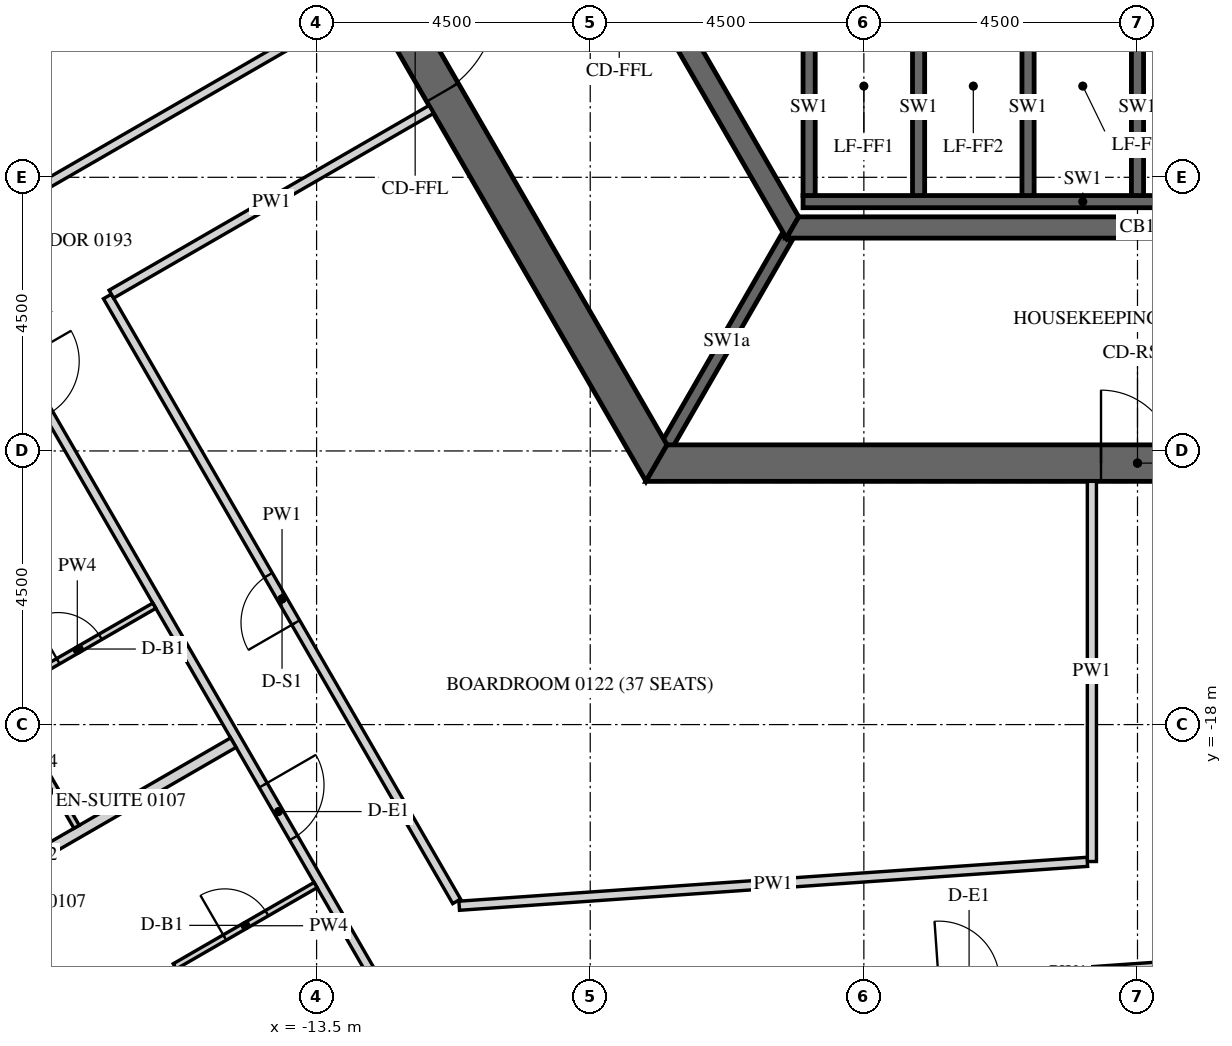
"""IFC4 building model, lengths in metres.
Left out: names, types, materials, properties, quantities, classifications, styles, units other than length and angle.
Written with IfcOpenShell. Run it as: python <this file> out.ifc"""

import sys

from ifc_helpers import new_model, si_unit, direction, frame, frame_2d, origin, place, context, subcontext, project, spatial, polyline, rectangle, outline, extrude, element, fill, save


model = new_model("IFC4")
c1 = context("Model", 3, precision=1e-05, world=origin(), true_north=direction((0.0, 1.0)))
c2 = subcontext(c1, "Body", "Model", "MODEL_VIEW")
j1 = project(units=[si_unit("LENGTHUNIT", "METRE"), si_unit("PLANEANGLEUNIT", "RADIAN")], contexts=[c1])
p1 = place(None, origin())
s1 = spatial("IfcSite", under=j1, at=p1, CompositionType="ELEMENT")
p2 = place(p1, origin())
s2 = spatial("IfcBuilding", under=s1, at=p2, CompositionType="ELEMENT")
p3 = place(p2, frame((0.0, 0.0, 37.5)))
s3 = spatial("IfcBuildingStorey", under=s2, at=p3, CompositionType="ELEMENT", Elevation=37.5)
p4 = place(p3, frame((-32.655, -2.89, -0.15), z_axis=(0.0, 0.0, 1.0), x_axis=(0.499997711317, -0.866026725152, 0.0)))
e1 = element("IfcWall", 1, at=p4, inside=s3, PredefinedType="SOLIDWALL", context=c2, shape_type="SweptSolid", body=[
    extrude(outline(polyline([(-0.022, -0.275), (30.097, -0.275), (30.045, 0.275), (0.022, 0.275), (-0.022, -0.275)])), origin(), (0.0, 0.0, 1.0), 3.9),
])
p5 = place(p4, frame((1.236, 0.0, 1.05)))
e2 = element("IfcOpeningElement", 2, at=p5, cuts=e1, PredefinedType="OPENING", context=c2, shape_type="SweptSolid", body=[
    extrude(rectangle(XDim=2.4, YDim=2.4, at=frame_2d((1.2, 1.2))), frame((0.0, 0.285, 0.0), z_axis=(0.0, -1.0, 0.0), x_axis=(1.0, 0.0, 0.0)), (0.0, 0.0, 1.0), 0.57),
])
p6 = place(p4, frame((4.835, 0.0, 1.05)))
e3 = element("IfcOpeningElement", 3, at=p6, cuts=e1, PredefinedType="OPENING", context=c2, shape_type="SweptSolid", body=[
    extrude(rectangle(XDim=2.4, YDim=2.4, at=frame_2d((1.2, 1.2))), frame((0.0, 0.285, 0.0), z_axis=(0.0, -1.0, 0.0), x_axis=(1.0, 0.0, 0.0)), (0.0, 0.0, 1.0), 0.57),
])
p7 = place(p4, frame((8.436, 0.0, 1.05)))
e4 = element("IfcOpeningElement", 4, at=p7, cuts=e1, PredefinedType="OPENING", context=c2, shape_type="SweptSolid", body=[
    extrude(rectangle(XDim=2.4, YDim=2.4, at=frame_2d((1.2, 1.2))), frame((0.0, 0.285, 0.0), z_axis=(0.0, -1.0, 0.0), x_axis=(1.0, 0.0, 0.0)), (0.0, 0.0, 1.0), 0.57),
])
p8 = place(p4, frame((12.035, 0.0, 1.05)))
e5 = element("IfcOpeningElement", 5, at=p8, cuts=e1, PredefinedType="OPENING", context=c2, shape_type="SweptSolid", body=[
    extrude(rectangle(XDim=2.4, YDim=2.4, at=frame_2d((1.2, 1.2))), frame((0.0, 0.285, 0.0), z_axis=(0.0, -1.0, 0.0), x_axis=(1.0, 0.0, 0.0)), (0.0, 0.0, 1.0), 0.57),
])
p9 = place(p4, frame((15.635, 0.0, 1.05)))
e6 = element("IfcOpeningElement", 6, at=p9, cuts=e1, PredefinedType="OPENING", context=c2, shape_type="SweptSolid", body=[
    extrude(rectangle(XDim=2.4, YDim=2.4, at=frame_2d((1.2, 1.2))), frame((0.0, 0.285, 0.0), z_axis=(0.0, -1.0, 0.0), x_axis=(1.0, 0.0, 0.0)), (0.0, 0.0, 1.0), 0.57),
])
p10 = place(p4, frame((19.236, 0.0, 1.05)))
e7 = element("IfcOpeningElement", 7, at=p10, cuts=e1, PredefinedType="OPENING", context=c2, shape_type="SweptSolid", body=[
    extrude(rectangle(XDim=2.4, YDim=2.4, at=frame_2d((1.2, 1.2))), frame((0.0, 0.285, 0.0), z_axis=(0.0, -1.0, 0.0), x_axis=(1.0, 0.0, 0.0)), (0.0, 0.0, 1.0), 0.57),
])
p11 = place(p4, frame((22.835, 0.0, 1.05)))
e8 = element("IfcOpeningElement", 8, at=p11, cuts=e1, PredefinedType="OPENING", context=c2, shape_type="SweptSolid", body=[
    extrude(rectangle(XDim=2.4, YDim=2.4, at=frame_2d((1.2, 1.2))), frame((0.0, 0.285, 0.0), z_axis=(0.0, -1.0, 0.0), x_axis=(1.0, 0.0, 0.0)), (0.0, 0.0, 1.0), 0.57),
])
p12 = place(p4, frame((26.436, 0.0, 1.05)))
e9 = element("IfcOpeningElement", 9, at=p12, cuts=e1, PredefinedType="OPENING", context=c2, shape_type="SweptSolid", body=[
    extrude(rectangle(XDim=2.4, YDim=2.4, at=frame_2d((1.2, 1.2))), frame((0.0, 0.285, 0.0), z_axis=(0.0, -1.0, 0.0), x_axis=(1.0, 0.0, 0.0)), (0.0, 0.0, 1.0), 0.57),
])
p13 = place(p3, frame((-15.819, 0.0, -0.15), z_axis=(0.0, 0.0, 1.0), x_axis=(0.499999880136, -0.866025472988, 0.0)))
e10 = element("IfcWall", 10, at=p13, inside=s3, PredefinedType="SHEAR", context=c2, shape_type="SweptSolid", body=[
    extrude(outline(polyline([(-0.173, -0.3), (15.993, -0.3), (15.646, 0.3), (0.173, 0.3), (-0.173, -0.3)])), origin(), (0.0, 0.0, 1.0), 3.9),
])
p14 = place(p13, frame((6.981, 0.0, 0.15)))
e11 = element("IfcOpeningElement", 11, at=p14, cuts=e10, PredefinedType="OPENING", context=c2, shape_type="SweptSolid", body=[
    extrude(rectangle(XDim=1.8, YDim=2.4, at=frame_2d((0.9, 1.2))), frame((0.0, 0.31, 0.0), z_axis=(0.0, -1.0, 0.0), x_axis=(1.0, 0.0, 0.0)), (0.0, 0.0, 1.0), 0.62),
])
p15 = place(p3, frame((-7.91, -13.7, -0.15), z_axis=(0.0, 0.0, 1.0), x_axis=(1.0, 0.0, 0.0)))
e12 = element("IfcWall", 12, at=p15, inside=s3, PredefinedType="SHEAR", context=c2, shape_type="SweptSolid", body=[
    extrude(outline(polyline([(-0.173, -0.3), (15.993, -0.3), (15.646, 0.3), (0.173, 0.3), (-0.173, -0.3)])), origin(), (0.0, 0.0, 1.0), 3.9),
])
p16 = place(p15, frame((7.31, 0.0, 0.15)))
e13 = element("IfcOpeningElement", 13, at=p16, cuts=e12, PredefinedType="OPENING", context=c2, shape_type="SweptSolid", body=[
    extrude(rectangle(XDim=1.2, YDim=2.4, at=frame_2d((0.6, 1.2))), frame((0.0, 0.31, 0.0), z_axis=(0.0, -1.0, 0.0), x_axis=(1.0, 0.0, 0.0)), (0.0, 0.0, 1.0), 0.62),
])
p17 = place(p3, frame((-11.345, 0.0, -0.15), z_axis=(0.0, 0.0, 1.0), x_axis=(0.499995046907, -0.866028263435, 0.0)))
e14 = element("IfcWall", 14, at=p17, inside=s3, PredefinedType="SHEAR", context=c2, shape_type="SweptSolid", body=[
    extrude(outline(polyline([(-0.101, -0.175), (11.446, -0.175), (11.244, 0.175), (0.101, 0.175), (-0.101, -0.175)])), origin(), (0.0, 0.0, 1.0), 3.9),
])
p18 = place(p17, frame((4.744, 0.0, 0.15)))
e15 = element("IfcOpeningElement", 15, at=p18, cuts=e14, PredefinedType="OPENING", context=c2, shape_type="SweptSolid", body=[
    extrude(rectangle(XDim=1.8, YDim=2.4, at=frame_2d((0.9, 1.2))), frame((0.0, 0.185, 0.0), z_axis=(0.0, -1.0, 0.0), x_axis=(1.0, 0.0, 0.0)), (0.0, 0.0, 1.0), 0.37),
])
p19 = place(p3, frame((-5.673, -9.825, -0.15), z_axis=(0.0, 0.0, 1.0), x_axis=(1.0, 0.0, 0.0)))
e16 = element("IfcWall", 16, at=p19, inside=s3, PredefinedType="SHEAR", context=c2, shape_type="SweptSolid", body=[
    extrude(outline(polyline([(-0.101, -0.175), (11.446, -0.175), (11.244, 0.175), (0.101, 0.175), (-0.101, -0.175)])), origin(), (0.0, 0.0, 1.0), 3.9),
])
p20 = place(p3, frame((-5.5, -9.4, -0.25), z_axis=(0.0, 0.0, 1.0), x_axis=(1.0, 0.0, 0.0)))
e17 = element("IfcWall", 17, at=p20, inside=s3, PredefinedType="SHEAR", context=c2, shape_type="SweptSolid", body=[
    extrude(rectangle(XDim=9.2, YDim=0.2, at=frame_2d((4.6, 0.0))), origin(), (0.0, 0.0, 1.0), 3.9),
])
for number, where, z_axis, x_axis in (
    (18, (-5.4, -9.3, -0.25), (0.0, 0.0, 1.0), (0.0, 1.0, 0.0)),
    (19, (-3.6, -9.3, -0.25), (0.0, 0.0, 1.0), (0.0, 1.0, 0.0)),
    (20, (-1.8, -9.3, -0.25), (0.0, 0.0, 1.0), (0.0, 1.0, 0.0)),
    (21, (0.0, -9.3, -0.25), (0.0, 0.0, 1.0), (0.0, 1.0, 0.0)),
):
    element("IfcWall", number, at=place(p3, frame(where, z_axis=z_axis, x_axis=x_axis)), inside=s3, PredefinedType="SHEAR", context=c2, shape_type="SweptSolid", body=[
        extrude(rectangle(XDim=2.9, YDim=0.2, at=frame_2d((1.45, 0.0))), origin(), (0.0, 0.0, 1.0), 3.9),
    ])
p21 = place(p3, frame((-5.773, -10.0, -0.15), z_axis=(0.0, 0.0, 1.0), x_axis=(-0.500038251005, -0.86600331843, 0.0)))
e22 = element("IfcWall", 22, at=p21, inside=s3, PredefinedType="SHEAR", context=c2, shape_type="SweptSolid", body=[
    extrude(rectangle(XDim=3.926, YDim=0.2, at=frame_2d((1.963, 0.0))), origin(), (0.0, 0.0, 1.0), 3.9),
])
p22 = place(p3, frame((-24.09, -2.175, 0.0), z_axis=(0.0, 0.0, 1.0), x_axis=(0.499996832073, -0.86602723278, 0.0)))
e23 = element("IfcWall", 23, at=p22, inside=s3, PredefinedType="PARTITIONING", context=c2, shape_type="SweptSolid", body=[
    extrude(rectangle(XDim=23.877, YDim=0.15, at=frame_2d((11.938, 0.0))), origin(), (0.0, 0.0, 1.0), 2.988),
])
p23 = place(p22, frame((4.543, 0.0, 0.0)))
e24 = element("IfcOpeningElement", 24, at=p23, cuts=e23, PredefinedType="OPENING", context=c2, shape_type="SweptSolid", body=[
    extrude(rectangle(XDim=1.0, YDim=2.1, at=frame_2d((0.5, 1.05))), frame((0.0, 0.085, 0.0), z_axis=(0.0, -1.0, 0.0), x_axis=(1.0, 0.0, 0.0)), (0.0, 0.0, 1.0), 0.17),
])
p24 = place(p22, frame((11.372, 0.0, 0.0)))
e25 = element("IfcOpeningElement", 25, at=p24, cuts=e23, PredefinedType="OPENING", context=c2, shape_type="SweptSolid", body=[
    extrude(rectangle(XDim=1.0, YDim=2.1, at=frame_2d((0.5, 1.05))), frame((0.0, 0.085, 0.0), z_axis=(0.0, -1.0, 0.0), x_axis=(1.0, 0.0, 0.0)), (0.0, 0.0, 1.0), 0.17),
])
p25 = place(p22, frame((19.425, 0.0, 0.0)))
e26 = element("IfcOpeningElement", 26, at=p25, cuts=e23, PredefinedType="OPENING", context=c2, shape_type="SweptSolid", body=[
    extrude(rectangle(XDim=1.0, YDim=2.1, at=frame_2d((0.5, 1.05))), frame((0.0, 0.085, 0.0), z_axis=(0.0, -1.0, 0.0), x_axis=(1.0, 0.0, 0.0)), (0.0, 0.0, 1.0), 0.17),
])
p26 = place(p3, frame((-12.151, -22.853, 0.0), z_axis=(0.0, 0.0, 1.0), x_axis=(0.99756425444, 0.069753553767, 0.0)))
e27 = element("IfcWall", 27, at=p26, inside=s3, PredefinedType="PARTITIONING", context=c2, shape_type="SweptSolid", body=[
    extrude(rectangle(XDim=22.085, YDim=0.15, at=frame_2d((11.042, 0.0))), origin(), (0.0, 0.0, 1.0), 2.988),
])
p27 = place(p26, frame((8.905, 0.0, 0.0)))
e28 = element("IfcOpeningElement", 28, at=p27, cuts=e27, PredefinedType="OPENING", context=c2, shape_type="SweptSolid", body=[
    extrude(rectangle(XDim=1.0, YDim=2.1, at=frame_2d((0.5, 1.05))), frame((0.0, 0.085, 0.0), z_axis=(0.0, -1.0, 0.0), x_axis=(1.0, 0.0, 0.0)), (0.0, 0.0, 1.0), 0.17),
])
p28 = place(p26, frame((19.795, 0.0, 0.0)))
e29 = element("IfcOpeningElement", 29, at=p28, cuts=e27, PredefinedType="OPENING", context=c2, shape_type="SweptSolid", body=[
    extrude(rectangle(XDim=1.0, YDim=2.1, at=frame_2d((0.5, 1.05))), frame((0.0, 0.085, 0.0), z_axis=(0.0, -1.0, 0.0), x_axis=(1.0, 0.0, 0.0)), (0.0, 0.0, 1.0), 0.17),
])
p29 = place(p3, frame((-12.664, -6.066, 0.0), z_axis=(0.0, 0.0, 1.0), x_axis=(-0.866023618125, -0.500003092839, 0.0)))
e30 = element("IfcWall", 30, at=p29, inside=s3, PredefinedType="PARTITIONING", context=c2, shape_type="SweptSolid", body=[
    extrude(rectangle(XDim=6.15, YDim=0.15, at=frame_2d((3.075, 0.0))), origin(), (0.0, 0.0, 1.0), 2.988),
])
p30 = place(p3, frame((-0.75, -14.0, 0.0), z_axis=(0.0, 0.0, 1.0), x_axis=(0.0, -1.0, 0.0)))
e31 = element("IfcWall", 31, at=p30, inside=s3, PredefinedType="PARTITIONING", context=c2, shape_type="SweptSolid", body=[
    extrude(rectangle(XDim=6.252, YDim=0.15, at=frame_2d((3.126, 0.0))), origin(), (0.0, 0.0, 1.0), 2.988),
])
p31 = place(p3, frame((-0.825, -20.257, 0.0), z_axis=(0.0, 0.0, 1.0), x_axis=(-0.9975635143, -0.069764137903, 0.0)))
e32 = element("IfcWall", 32, at=p31, inside=s3, PredefinedType="PARTITIONING", context=c2, shape_type="SweptSolid", body=[
    extrude(rectangle(XDim=10.355, YDim=0.15, at=frame_2d((5.177, 0.0))), origin(), (0.0, 0.0, 1.0), 2.988),
])
p32 = place(p3, frame((-11.197, -20.907, 0.0), z_axis=(0.0, 0.0, 1.0), x_axis=(-0.500004557924, 0.86602277225, 0.0)))
e33 = element("IfcWall", 33, at=p32, inside=s3, PredefinedType="PARTITIONING", context=c2, shape_type="SweptSolid", body=[
    extrude(rectangle(XDim=11.487, YDim=0.15, at=frame_2d((5.743, 0.0))), origin(), (0.0, 0.0, 1.0), 2.988),
])
p33 = place(p32, frame((5.293, 0.0, 0.0)))
e34 = element("IfcOpeningElement", 34, at=p33, cuts=e33, PredefinedType="OPENING", context=c2, shape_type="SweptSolid", body=[
    extrude(rectangle(XDim=0.9, YDim=2.1, at=frame_2d((0.45, 1.05))), frame((0.0, 0.085, 0.0), z_axis=(0.0, -1.0, 0.0), x_axis=(1.0, 0.0, 0.0)), (0.0, 0.0, 1.0), 0.17),
])
p34 = place(p3, frame((-16.875, -10.922, 0.0), z_axis=(0.0, 0.0, 1.0), x_axis=(0.866023634079, 0.500003065207, 0.0)))
e35 = element("IfcWall", 35, at=p34, inside=s3, PredefinedType="PARTITIONING", context=c2, shape_type="SweptSolid", body=[
    extrude(rectangle(XDim=6.075, YDim=0.15, at=frame_2d((3.038, 0.0))), origin(), (0.0, 0.0, 1.0), 2.988),
])
p35 = place(p3, frame((-18.702, -17.508, 0.0), z_axis=(0.0, 0.0, 1.0), x_axis=(0.86601045545, 0.500025890382, 0.0)))
e36 = element("IfcWall", 36, at=p35, inside=s3, PredefinedType="PARTITIONING", context=c2, shape_type="SweptSolid", body=[
    extrude(rectangle(XDim=2.925, YDim=0.1, at=frame_2d((1.462, 0.0))), origin(), (0.0, 0.0, 1.0), 2.988),
])
p36 = place(p35, frame((1.1, 0.0, 0.0)))
e37 = element("IfcOpeningElement", 37, at=p36, cuts=e36, PredefinedType="OPENING", context=c2, shape_type="SweptSolid", body=[
    extrude(rectangle(XDim=0.8, YDim=2.1, at=frame_2d((0.4, 1.05))), frame((0.0, 0.06, 0.0), z_axis=(0.0, -1.0, 0.0), x_axis=(1.0, 0.0, 0.0)), (0.0, 0.0, 1.0), 0.12),
])
p37 = place(p3, frame((-21.299, -22.009, 0.0), z_axis=(0.0, 0.0, 1.0), x_axis=(0.866014745021, 0.500018461065, 0.0)))
e38 = element("IfcWall", 38, at=p37, inside=s3, PredefinedType="PARTITIONING", context=c2, shape_type="SweptSolid", body=[
    extrude(rectangle(XDim=7.425, YDim=0.18, at=frame_2d((3.712, 0.0))), origin(), (0.0, 0.0, 1.0), 2.988),
])
p38 = place(p3, frame((-18.677, -17.551, 0.0), z_axis=(0.0, 0.0, 1.0), x_axis=(0.500003092839, -0.866023618125, 0.0)))
e39 = element("IfcWall", 39, at=p38, inside=s3, PredefinedType="PARTITIONING", context=c2, shape_type="SweptSolid", body=[
    extrude(rectangle(XDim=2.46, YDim=0.1, at=frame_2d((1.23, 0.0))), origin(), (0.0, 0.0, 1.0), 2.988),
])
p39 = place(p3, frame((-14.601, -24.21, 0.0), z_axis=(0.0, 0.0, 1.0), x_axis=(-0.500062241894, 0.865989465428, 0.0)))
e40 = element("IfcWall", 40, at=p39, inside=s3, PredefinedType="PARTITIONING", context=c2, shape_type="SweptSolid", body=[
    extrude(rectangle(XDim=2.55, YDim=0.1, at=frame_2d((1.275, 0.0))), origin(), (0.0, 0.0, 1.0), 2.988),
])
p40 = place(p3, frame((-15.833, -21.977, 0.0), z_axis=(0.0, 0.0, 1.0), x_axis=(0.86604424267, 0.499967368674, 0.0)))
e41 = element("IfcWall", 41, at=p40, inside=s3, PredefinedType="PARTITIONING", context=c2, shape_type="SweptSolid", body=[
    extrude(rectangle(XDim=2.675, YDim=0.1, at=frame_2d((1.337, 0.0))), origin(), (0.0, 0.0, 1.0), 2.988),
])
p41 = place(p40, frame((0.95, 0.0, 0.0)))
e42 = element("IfcOpeningElement", 42, at=p41, cuts=e41, PredefinedType="OPENING", context=c2, shape_type="SweptSolid", body=[
    extrude(rectangle(XDim=0.8, YDim=2.1, at=frame_2d((0.4, 1.05))), frame((0.0, 0.06, 0.0), z_axis=(0.0, -1.0, 0.0), x_axis=(1.0, 0.0, 0.0)), (0.0, 0.0, 1.0), 0.12),
])
p42 = place(p14, origin())
e43 = element("IfcDoor", 43, at=p42, inside=s3, OperationType="DOUBLE_DOOR_SINGLE_SWING", PredefinedType="DOOR", context=c2, shape_type="SweptSolid", body=[
    extrude(rectangle(XDim=1.8, YDim=2.4, at=frame_2d((0.9, 1.2))), frame((0.0, 0.025, 0.0), z_axis=(0.0, -1.0, 0.0), x_axis=(1.0, 0.0, 0.0)), (0.0, 0.0, 1.0), 0.05),
])
fill(e11, e43)
p43 = place(p16, origin())
e44 = element("IfcDoor", 44, at=p43, inside=s3, OperationType="SINGLE_SWING_LEFT", PredefinedType="DOOR", context=c2, shape_type="SweptSolid", body=[
    extrude(rectangle(XDim=1.2, YDim=2.4, at=frame_2d((0.6, 1.2))), frame((0.0, 0.025, 0.0), z_axis=(0.0, -1.0, 0.0), x_axis=(1.0, 0.0, 0.0)), (0.0, 0.0, 1.0), 0.05),
])
fill(e13, e44)
p44 = place(p36, origin())
e45 = element("IfcDoor", 45, at=p44, inside=s3, OperationType="SINGLE_SWING_LEFT", PredefinedType="DOOR", context=c2, shape_type="SweptSolid", body=[
    extrude(rectangle(XDim=0.8, YDim=2.1, at=frame_2d((0.4, 1.05))), frame((0.0, 0.025, 0.0), z_axis=(0.0, -1.0, 0.0), x_axis=(1.0, 0.0, 0.0)), (0.0, 0.0, 1.0), 0.05),
])
fill(e37, e45)
p45 = place(p25, origin())
e46 = element("IfcDoor", 46, at=p45, inside=s3, OperationType="SINGLE_SWING_RIGHT", PredefinedType="DOOR", context=c2, shape_type="SweptSolid", body=[
    extrude(rectangle(XDim=1.0, YDim=2.1, at=frame_2d((0.5, 1.05))), frame((0.0, 0.025, 0.0), z_axis=(0.0, -1.0, 0.0), x_axis=(1.0, 0.0, 0.0)), (0.0, 0.0, 1.0), 0.05),
])
fill(e26, e46)
p46 = place(p41, origin())
e47 = element("IfcDoor", 47, at=p46, inside=s3, OperationType="SINGLE_SWING_LEFT", PredefinedType="DOOR", context=c2, shape_type="SweptSolid", body=[
    extrude(rectangle(XDim=0.8, YDim=2.1, at=frame_2d((0.4, 1.05))), frame((0.0, 0.025, 0.0), z_axis=(0.0, -1.0, 0.0), x_axis=(1.0, 0.0, 0.0)), (0.0, 0.0, 1.0), 0.05),
])
fill(e42, e47)
p47 = place(p33, origin())
e48 = element("IfcDoor", 48, at=p47, inside=s3, OperationType="SINGLE_SWING_RIGHT", PredefinedType="DOOR", context=c2, shape_type="SweptSolid", body=[
    extrude(rectangle(XDim=0.9, YDim=2.1, at=frame_2d((0.45, 1.05))), frame((0.0, 0.025, 0.0), z_axis=(0.0, -1.0, 0.0), x_axis=(1.0, 0.0, 0.0)), (0.0, 0.0, 1.0), 0.05),
])
fill(e34, e48)
save(model, sys.argv[1])
